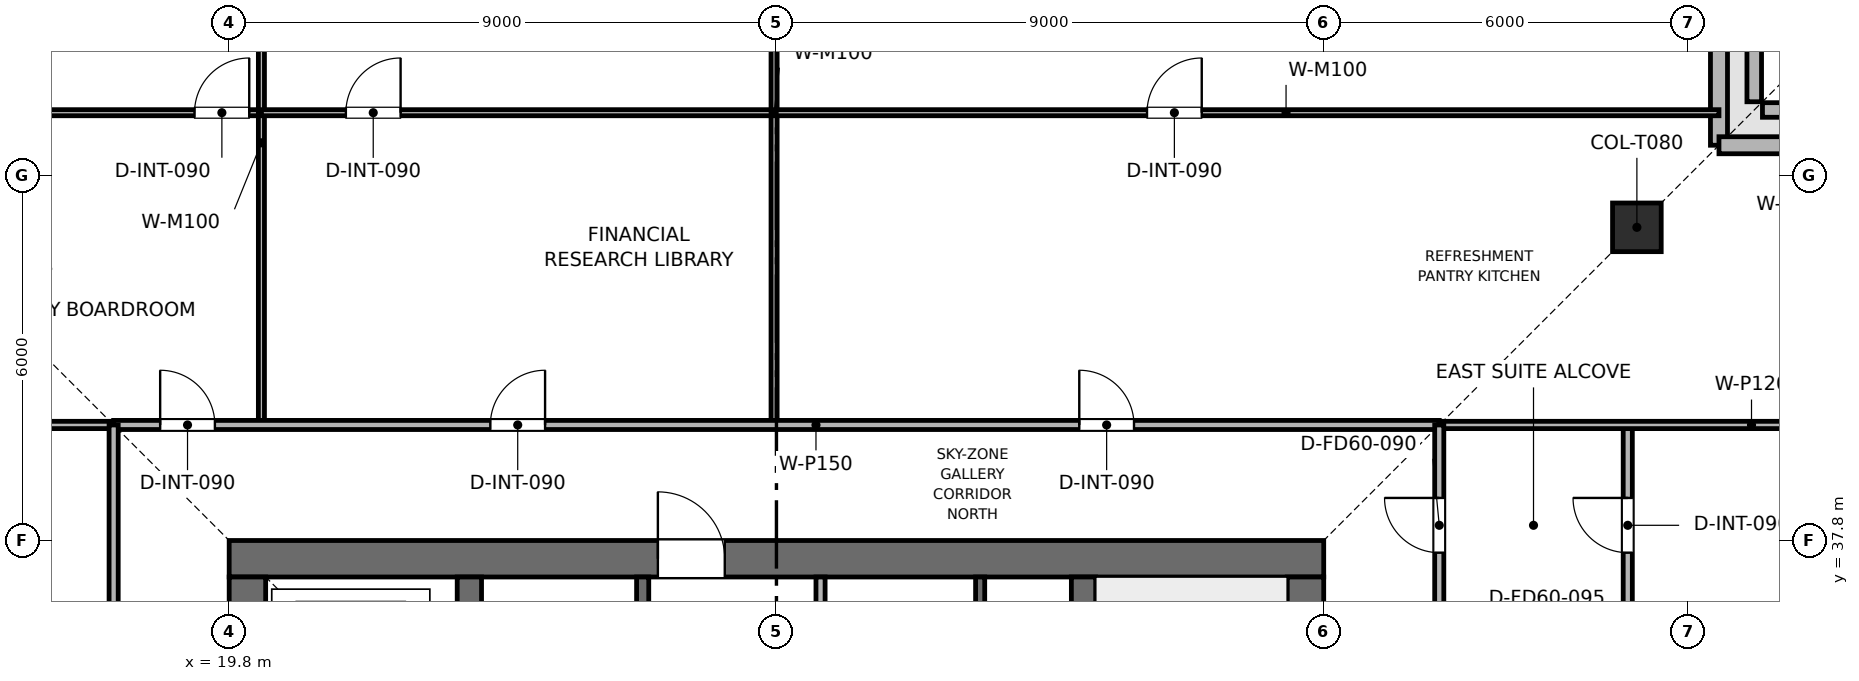
"""IFC4 building model, lengths in metres.
Left out: names, types, materials, properties, quantities, classifications, styles, units other than length and angle.
Written with IfcOpenShell. Run it as: python <this file> out.ifc"""

import sys

from ifc_helpers import new_model, si_unit, direction, frame, frame_2d, origin, origin_2d, place, context, subcontext, project, spatial, rectangle, extrude, element, fill, save


model = new_model("IFC4")
c1 = context("Model", 3, precision=1e-05, world=origin(), true_north=direction((0.0, 1.0)))
c2 = subcontext(c1, "Body", "Model", "MODEL_VIEW")
j1 = project(units=[si_unit("LENGTHUNIT", "METRE"), si_unit("PLANEANGLEUNIT", "RADIAN")], contexts=[c1])
p1 = place(None, origin())
s1 = spatial("IfcSite", under=j1, at=p1, CompositionType="ELEMENT")
p2 = place(p1, origin())
s2 = spatial("IfcBuilding", under=s1, at=p2, CompositionType="ELEMENT")
p3 = place(p2, frame((0.0, 0.0, 344.25)))
s3 = spatial("IfcBuildingStorey", under=s2, at=p3, CompositionType="ELEMENT", Elevation=344.25)
p4 = place(p3, frame((19.8, 37.5, 0.0), z_axis=(0.0, 0.0, 1.0), x_axis=(1.0, 0.0, 0.0)))
e1 = element("IfcWall", 1, at=p4, inside=s3, PredefinedType="SHEAR", context=c2, shape_type="SweptSolid", body=[
    extrude(rectangle(XDim=18.0, YDim=0.6, at=frame_2d((9.0, 0.0))), origin(), (0.0, 0.0, 1.0), 3.75),
])
p5 = place(p4, frame((7.05, 0.0, 0.0)))
e2 = element("IfcOpeningElement", 2, at=p5, cuts=e1, PredefinedType="OPENING", context=c2, shape_type="SweptSolid", body=[
    extrude(rectangle(XDim=1.1, YDim=2.15, at=frame_2d((0.55, 1.075))), frame((0.0, 0.31, 0.0), z_axis=(0.0, -1.0, 0.0), x_axis=(1.0, 0.0, 0.0)), (0.0, 0.0, 1.0), 0.62),
])
p6 = place(p3, frame((20.1, 20.4, 0.0), z_axis=(0.0, 0.0, 1.0), x_axis=(0.0, 1.0, 0.0)))
e3 = element("IfcWall", 3, at=p6, inside=s3, PredefinedType="SHEAR", context=c2, shape_type="SweptSolid", body=[
    extrude(rectangle(XDim=16.8, YDim=0.6, at=frame_2d((8.4, 0.0))), origin(), (0.0, 0.0, 1.0), 3.75),
])
p7 = place(p6, frame((10.4, 0.0, 0.0)))
e4 = element("IfcOpeningElement", 4, at=p7, cuts=e3, PredefinedType="OPENING", context=c2, shape_type="SweptSolid", body=[
    extrude(rectangle(XDim=1.1, YDim=2.15, at=frame_2d((0.55, 1.075))), frame((0.0, 0.31, 0.0), z_axis=(0.0, -1.0, 0.0), x_axis=(1.0, 0.0, 0.0)), (0.0, 0.0, 1.0), 0.62),
])
p8 = place(p3, frame((37.5, 20.4, 0.0), z_axis=(0.0, 0.0, 1.0), x_axis=(0.0, 1.0, 0.0)))
e5 = element("IfcWall", 5, at=p8, inside=s3, PredefinedType="SHEAR", context=c2, shape_type="SweptSolid", body=[
    extrude(rectangle(XDim=16.8, YDim=0.6, at=frame_2d((8.4, 0.0))), origin(), (0.0, 0.0, 1.0), 3.75),
])
p9 = place(p8, frame((4.9, 0.0, 0.0)))
e6 = element("IfcOpeningElement", 6, at=p9, cuts=e5, PredefinedType="OPENING", context=c2, shape_type="SweptSolid", body=[
    extrude(rectangle(XDim=1.1, YDim=2.15, at=frame_2d((0.55, 1.075))), frame((0.0, 0.31, 0.0), z_axis=(0.0, -1.0, 0.0), x_axis=(1.0, 0.0, 0.0)), (0.0, 0.0, 1.0), 0.62),
])
for number, where, z_axis, x_axis in (
    (7, (23.75, 20.4, 0.0), (0.0, 0.0, 1.0), (0.0, 1.0, 0.0)),
    (8, (33.85, 20.4, 0.0), (0.0, 0.0, 1.0), (0.0, 1.0, 0.0)),
):
    element("IfcWall", number, at=place(p3, frame(where, z_axis=z_axis, x_axis=x_axis)), inside=s3, PredefinedType="SHEAR", context=c2, shape_type="SweptSolid", body=[
        extrude(rectangle(XDim=16.8, YDim=0.4, at=frame_2d((8.4, 0.0))), origin(), (0.0, 0.0, 1.0), 3.75),
    ])
p10 = place(p3, frame((42.95, 42.95, 0.003), z_axis=(0.0, 0.0, 1.0), x_axis=(1.0, 0.0, 0.0)))
e9 = element("IfcColumn", 9, at=p10, inside=s3, PredefinedType="COLUMN", context=c2, shape_type="SweptSolid", body=[
    extrude(rectangle(XDim=0.8, YDim=0.8, at=origin_2d()), origin(), (0.0, 0.0, 1.0), 3.504),
])
for number, where, z_axis, x_axis in (
    (10, (50.745, 44.88, 0.0), (0.0, 0.0, 1.0), (-1.0, 0.0, 0.0)),
    (11, (44.88, 45.015, 0.0), (0.0, 0.0, 1.0), (0.0, 1.0, 0.0)),
):
    element("IfcWall", number, at=place(p3, frame(where, z_axis=z_axis, x_axis=x_axis)), inside=s3, PredefinedType="PARAPET", context=c2, shape_type="SweptSolid", body=[
        extrude(rectangle(XDim=5.73, YDim=0.24, at=frame_2d((2.865, 0.0))), origin(), (0.0, 0.0, 1.0), 1.2),
    ])
p11 = place(p3, frame((44.3, 49.97, 0.0), z_axis=(0.0, 0.0, 1.0), x_axis=(0.0, -1.0, 0.0)))
e12 = element("IfcWall", 12, at=p11, inside=s3, PredefinedType="SOLIDWALL", context=c2, shape_type="SweptSolid", body=[
    extrude(rectangle(XDim=5.67, YDim=0.28, at=frame_2d((2.835, 0.0))), origin(), (0.0, 0.0, 1.0), 3.51),
])
p12 = place(p11, frame((1.585, 0.0, 0.9)))
e13 = element("IfcOpeningElement", 13, at=p12, cuts=e12, PredefinedType="OPENING", context=c2, shape_type="SweptSolid", body=[
    extrude(rectangle(XDim=2.5, YDim=1.9, at=frame_2d((1.25, 0.95))), frame((0.0, 0.15, 0.0), z_axis=(0.0, -1.0, 0.0), x_axis=(1.0, 0.0, 0.0)), (0.0, 0.0, 1.0), 0.3),
])
p13 = place(p3, frame((44.3, 44.3, 0.0), z_axis=(0.0, 0.0, 1.0), x_axis=(1.0, 0.0, 0.0)))
e14 = element("IfcWall", 14, at=p13, inside=s3, PredefinedType="SOLIDWALL", context=c2, shape_type="SweptSolid", body=[
    extrude(rectangle(XDim=5.67, YDim=0.28, at=frame_2d((2.835, 0.0))), origin(), (0.0, 0.0, 1.0), 3.51),
])
p14 = place(p13, frame((1.585, 0.0, 0.9)))
e15 = element("IfcOpeningElement", 15, at=p14, cuts=e14, PredefinedType="OPENING", context=c2, shape_type="SweptSolid", body=[
    extrude(rectangle(XDim=2.5, YDim=1.9, at=frame_2d((1.25, 0.95))), frame((0.0, 0.15, 0.0), z_axis=(0.0, -1.0, 0.0), x_axis=(1.0, 0.0, 0.0)), (0.0, 0.0, 1.0), 0.3),
])
p15 = place(p3, frame((32.15, 34.0, 0.0), z_axis=(0.0, 0.0, 1.0), x_axis=(0.0, 1.0, 0.0)))
e16 = element("IfcWall", 16, at=p15, inside=s3, PredefinedType="SHEAR", context=c2, shape_type="SweptSolid", body=[
    extrude(rectangle(XDim=3.2, YDim=0.15, at=frame_2d((1.6, 0.0))), origin(), (0.0, 0.0, 1.0), 3.51),
])
p16 = place(p3, frame((26.6, 34.0, 0.0), z_axis=(0.0, 0.0, 1.0), x_axis=(0.0, 1.0, 0.0)))
e17 = element("IfcWall", 17, at=p16, inside=s3, PredefinedType="SHEAR", context=c2, shape_type="SweptSolid", body=[
    extrude(rectangle(XDim=3.2, YDim=0.2, at=frame_2d((1.6, 0.0))), origin(), (0.0, 0.0, 1.0), 3.51),
])
p17 = place(p16, frame((0.75, 0.0, 0.0)))
e18 = element("IfcOpeningElement", 18, at=p17, cuts=e17, PredefinedType="OPENING", context=c2, shape_type="SweptSolid", body=[
    extrude(rectangle(XDim=1.1, YDim=2.15, at=frame_2d((0.55, 1.075))), frame((0.0, 0.11, 0.0), z_axis=(0.0, -1.0, 0.0), x_axis=(1.0, 0.0, 0.0)), (0.0, 0.0, 1.0), 0.22),
])
p18 = place(p3, frame((29.525, 33.925, 0.0), z_axis=(0.0, 0.0, 1.0), x_axis=(0.0, 1.0, 0.0)))
e19 = element("IfcWall", 19, at=p18, inside=s3, PredefinedType="PARTITIONING", context=c2, shape_type="SweptSolid", body=[
    extrude(rectangle(XDim=3.275, YDim=0.15, at=frame_2d((1.637, 0.0))), origin(), (0.0, 0.0, 1.0), 3.51),
])
p19 = place(p18, frame((0.85, 0.0, 0.0)))
e20 = element("IfcOpeningElement", 20, at=p19, cuts=e19, PredefinedType="OPENING", context=c2, shape_type="SweptSolid", body=[
    extrude(rectangle(XDim=0.9, YDim=2.1, at=frame_2d((0.45, 1.05))), frame((0.0, 0.085, 0.0), z_axis=(0.0, -1.0, 0.0), x_axis=(1.0, 0.0, 0.0)), (0.0, 0.0, 1.0), 0.17),
])
p20 = place(p3, frame((13.3, 44.835, 0.0), z_axis=(0.0, 0.0, 1.0), x_axis=(1.0, 0.0, 0.0)))
e21 = element("IfcWall", 21, at=p20, inside=s3, PredefinedType="MOVABLE", context=c2, shape_type="SweptSolid", body=[
    extrude(rectangle(XDim=7.03, YDim=0.1, at=frame_2d((3.515, 0.0))), origin(), (0.0, 0.0, 1.0), 3.095),
])
p21 = place(p20, frame((5.93, 0.0, 0.0)))
e22 = element("IfcOpeningElement", 22, at=p21, cuts=e21, PredefinedType="OPENING", context=c2, shape_type="SweptSolid", body=[
    extrude(rectangle(XDim=0.9, YDim=2.1, at=frame_2d((0.45, 1.05))), frame((0.0, 0.06, 0.0), z_axis=(0.0, -1.0, 0.0), x_axis=(1.0, 0.0, 0.0)), (0.0, 0.0, 1.0), 0.12),
])
p22 = place(p3, frame((20.33, 39.7, 0.0), z_axis=(0.0, 0.0, 1.0), x_axis=(0.0, 1.0, 0.0)))
e23 = element("IfcWall", 23, at=p22, inside=s3, PredefinedType="MOVABLE", context=c2, shape_type="SweptSolid", body=[
    extrude(rectangle(XDim=10.27, YDim=0.1, at=frame_2d((5.135, 0.0))), origin(), (0.0, 0.0, 1.0), 3.095),
])
p23 = place(p3, frame((20.33, 44.835, 0.0), z_axis=(0.0, 0.0, 1.0), x_axis=(1.0, 0.0, 0.0)))
e24 = element("IfcWall", 24, at=p23, inside=s3, PredefinedType="MOVABLE", context=c2, shape_type="SweptSolid", body=[
    extrude(rectangle(XDim=8.431, YDim=0.1, at=frame_2d((4.215, 0.0))), origin(), (0.0, 0.0, 1.0), 3.095),
])
p24 = place(p23, frame((1.389, 0.0, 0.0)))
e25 = element("IfcOpeningElement", 25, at=p24, cuts=e24, PredefinedType="OPENING", context=c2, shape_type="SweptSolid", body=[
    extrude(rectangle(XDim=0.9, YDim=2.1, at=frame_2d((0.45, 1.05))), frame((0.0, 0.06, 0.0), z_axis=(0.0, -1.0, 0.0), x_axis=(1.0, 0.0, 0.0)), (0.0, 0.0, 1.0), 0.12),
])
p25 = place(p3, frame((28.761, 39.7, 0.0), z_axis=(0.0, 0.0, 1.0), x_axis=(0.0, 1.0, 0.0)))
e26 = element("IfcWall", 26, at=p25, inside=s3, PredefinedType="MOVABLE", context=c2, shape_type="SweptSolid", body=[
    extrude(rectangle(XDim=10.27, YDim=0.1, at=frame_2d((5.135, 0.0))), origin(), (0.0, 0.0, 1.0), 2.995),
])
p26 = place(p3, frame((28.761, 44.835, 0.0), z_axis=(0.0, 0.0, 1.0), x_axis=(1.0, 0.0, 0.0)))
e27 = element("IfcWall", 27, at=p26, inside=s3, PredefinedType="MOVABLE", context=c2, shape_type="SweptSolid", body=[
    extrude(rectangle(XDim=15.539, YDim=0.1, at=frame_2d((7.77, 0.0))), origin(), (0.0, 0.0, 1.0), 3.095),
])
p27 = place(p26, frame((6.133, 0.0, 0.0)))
e28 = element("IfcOpeningElement", 28, at=p27, cuts=e27, PredefinedType="OPENING", context=c2, shape_type="SweptSolid", body=[
    extrude(rectangle(XDim=0.9, YDim=2.1, at=frame_2d((0.45, 1.05))), frame((0.0, 0.06, 0.0), z_axis=(0.0, -1.0, 0.0), x_axis=(1.0, 0.0, 0.0)), (0.0, 0.0, 1.0), 0.12),
])
p28 = place(p3, frame((42.8, 28.0, 0.0), z_axis=(0.0, 0.0, 1.0), x_axis=(0.0, 1.0, 0.0)))
e29 = element("IfcWall", 29, at=p28, inside=s3, PredefinedType="PARTITIONING", context=c2, shape_type="SweptSolid", body=[
    extrude(rectangle(XDim=11.7, YDim=0.15, at=frame_2d((5.85, 0.0))), origin(), (0.0, 0.0, 1.0), 3.095),
])
p29 = place(p28, frame((9.6, 0.0, 0.0)))
e30 = element("IfcOpeningElement", 30, at=p29, cuts=e29, PredefinedType="OPENING", context=c2, shape_type="SweptSolid", body=[
    extrude(rectangle(XDim=0.9, YDim=2.1, at=frame_2d((0.45, 1.05))), frame((0.0, 0.085, 0.0), z_axis=(0.0, -1.0, 0.0), x_axis=(1.0, 0.0, 0.0)), (0.0, 0.0, 1.0), 0.17),
])
for number, where, z_axis, x_axis in (
    (31, (7.63, 39.7, 0.0), (0.0, 0.0, 1.0), (1.0, 0.0, 0.0)),
    (32, (39.7, 39.7, 0.0), (0.0, 0.0, 1.0), (1.0, 0.0, 0.0)),
):
    element("IfcWall", number, at=place(p3, frame(where, z_axis=z_axis, x_axis=x_axis)), inside=s3, PredefinedType="PARTITIONING", context=c2, shape_type="SweptSolid", body=[
        extrude(rectangle(XDim=10.27, YDim=0.12, at=frame_2d((5.135, 0.0))), origin(), (0.0, 0.0, 1.0), 3.095),
    ])
p30 = place(p3, frame((17.9, 39.7, 0.0), z_axis=(0.0, 0.0, 1.0), x_axis=(1.0, 0.0, 0.0)))
e33 = element("IfcWall", 33, at=p30, inside=s3, PredefinedType="PARTITIONING", context=c2, shape_type="SweptSolid", body=[
    extrude(rectangle(XDim=21.8, YDim=0.15, at=frame_2d((10.9, 0.0))), origin(), (0.0, 0.0, 1.0), 3.095),
])
p31 = place(p30, frame((0.765, 0.0, 0.0)))
e34 = element("IfcOpeningElement", 34, at=p31, cuts=e33, PredefinedType="OPENING", context=c2, shape_type="SweptSolid", body=[
    extrude(rectangle(XDim=0.9, YDim=2.1, at=frame_2d((0.45, 1.05))), frame((0.0, 0.085, 0.0), z_axis=(0.0, -1.0, 0.0), x_axis=(1.0, 0.0, 0.0)), (0.0, 0.0, 1.0), 0.17),
])
p32 = place(p30, frame((6.195, 0.0, 0.0)))
e35 = element("IfcOpeningElement", 35, at=p32, cuts=e33, PredefinedType="OPENING", context=c2, shape_type="SweptSolid", body=[
    extrude(rectangle(XDim=0.9, YDim=2.1, at=frame_2d((0.45, 1.05))), frame((0.0, 0.085, 0.0), z_axis=(0.0, -1.0, 0.0), x_axis=(1.0, 0.0, 0.0)), (0.0, 0.0, 1.0), 0.17),
])
p33 = place(p30, frame((15.88, 0.0, 0.0)))
e36 = element("IfcOpeningElement", 36, at=p33, cuts=e33, PredefinedType="OPENING", context=c2, shape_type="SweptSolid", body=[
    extrude(rectangle(XDim=0.9, YDim=2.1, at=frame_2d((0.45, 1.05))), frame((0.0, 0.085, 0.0), z_axis=(0.0, -1.0, 0.0), x_axis=(1.0, 0.0, 0.0)), (0.0, 0.0, 1.0), 0.17),
])
p34 = place(p3, frame((17.9, 13.3, 0.0), z_axis=(0.0, 0.0, 1.0), x_axis=(0.0, 1.0, 0.0)))
e37 = element("IfcWall", 37, at=p34, inside=s3, PredefinedType="PARTITIONING", context=c2, shape_type="SweptSolid", body=[
    extrude(rectangle(XDim=26.4, YDim=0.15, at=frame_2d((13.2, 0.0))), origin(), (0.0, 0.0, 1.0), 3.095),
])
p35 = place(p34, frame((12.75, 0.0, 0.0)))
e38 = element("IfcOpeningElement", 38, at=p35, cuts=e37, PredefinedType="OPENING", context=c2, shape_type="SweptSolid", body=[
    extrude(rectangle(XDim=0.9, YDim=2.1, at=frame_2d((0.45, 1.05))), frame((0.0, 0.085, 0.0), z_axis=(0.0, -1.0, 0.0), x_axis=(1.0, 0.0, 0.0)), (0.0, 0.0, 1.0), 0.17),
])
p36 = place(p3, frame((39.7, 24.4, 0.0), z_axis=(0.0, 0.0, 1.0), x_axis=(0.0, 1.0, 0.0)))
e39 = element("IfcWall", 39, at=p36, inside=s3, PredefinedType="PARTITIONING", context=c2, shape_type="SweptSolid", body=[
    extrude(rectangle(XDim=15.3, YDim=0.15, at=frame_2d((7.65, 0.0))), origin(), (0.0, 0.0, 1.0), 3.095),
])
p37 = place(p36, frame((1.35, 0.0, 0.0)))
e40 = element("IfcOpeningElement", 40, at=p37, cuts=e39, PredefinedType="OPENING", context=c2, shape_type="SweptSolid", body=[
    extrude(rectangle(XDim=0.9, YDim=2.1, at=frame_2d((0.45, 1.05))), frame((0.0, 0.085, 0.0), z_axis=(0.0, -1.0, 0.0), x_axis=(1.0, 0.0, 0.0)), (0.0, 0.0, 1.0), 0.17),
])
p38 = place(p36, frame((4.55, 0.0, 0.0)))
e41 = element("IfcOpeningElement", 41, at=p38, cuts=e39, PredefinedType="OPENING", context=c2, shape_type="SweptSolid", body=[
    extrude(rectangle(XDim=0.9, YDim=2.1, at=frame_2d((0.45, 1.05))), frame((0.0, 0.085, 0.0), z_axis=(0.0, -1.0, 0.0), x_axis=(1.0, 0.0, 0.0)), (0.0, 0.0, 1.0), 0.17),
])
p39 = place(p36, frame((7.45, 0.0, 0.0)))
e42 = element("IfcOpeningElement", 42, at=p39, cuts=e39, PredefinedType="OPENING", context=c2, shape_type="SweptSolid", body=[
    extrude(rectangle(XDim=0.9, YDim=2.1, at=frame_2d((0.45, 1.05))), frame((0.0, 0.085, 0.0), z_axis=(0.0, -1.0, 0.0), x_axis=(1.0, 0.0, 0.0)), (0.0, 0.0, 1.0), 0.17),
])
p40 = place(p36, frame((10.2, 0.0, 0.0)))
e43 = element("IfcOpeningElement", 43, at=p40, cuts=e39, PredefinedType="OPENING", context=c2, shape_type="SweptSolid", body=[
    extrude(rectangle(XDim=0.95, YDim=2.1, at=frame_2d((0.475, 1.05))), frame((0.0, 0.085, 0.0), z_axis=(0.0, -1.0, 0.0), x_axis=(1.0, 0.0, 0.0)), (0.0, 0.0, 1.0), 0.17),
])
p41 = place(p36, frame((13.2, 0.0, 0.0)))
e44 = element("IfcOpeningElement", 44, at=p41, cuts=e39, PredefinedType="OPENING", context=c2, shape_type="SweptSolid", body=[
    extrude(rectangle(XDim=0.9, YDim=2.1, at=frame_2d((0.45, 1.05))), frame((0.0, 0.085, 0.0), z_axis=(0.0, -1.0, 0.0), x_axis=(1.0, 0.0, 0.0)), (0.0, 0.0, 1.0), 0.17),
])
p42 = place(p21, origin())
e45 = element("IfcDoor", 45, at=p42, inside=s3, OperationType="SINGLE_SWING_RIGHT", PredefinedType="DOOR", context=c2, shape_type="SweptSolid", body=[
    extrude(rectangle(XDim=0.9, YDim=2.1, at=frame_2d((0.45, 1.05))), frame((0.0, 0.025, 0.0), z_axis=(0.0, -1.0, 0.0), x_axis=(1.0, 0.0, 0.0)), (0.0, 0.0, 1.0), 0.05),
])
fill(e22, e45)
p43 = place(p24, origin())
e46 = element("IfcDoor", 46, at=p43, inside=s3, OperationType="SINGLE_SWING_RIGHT", PredefinedType="DOOR", context=c2, shape_type="SweptSolid", body=[
    extrude(rectangle(XDim=0.9, YDim=2.1, at=frame_2d((0.45, 1.05))), frame((0.0, 0.025, 0.0), z_axis=(0.0, -1.0, 0.0), x_axis=(1.0, 0.0, 0.0)), (0.0, 0.0, 1.0), 0.05),
])
fill(e25, e46)
p44 = place(p27, origin())
e47 = element("IfcDoor", 47, at=p44, inside=s3, OperationType="SINGLE_SWING_RIGHT", PredefinedType="DOOR", context=c2, shape_type="SweptSolid", body=[
    extrude(rectangle(XDim=0.9, YDim=2.1, at=frame_2d((0.45, 1.05))), frame((0.0, 0.025, 0.0), z_axis=(0.0, -1.0, 0.0), x_axis=(1.0, 0.0, 0.0)), (0.0, 0.0, 1.0), 0.05),
])
fill(e28, e47)
p45 = place(p29, origin())
e48 = element("IfcDoor", 48, at=p45, inside=s3, OperationType="SINGLE_SWING_RIGHT", PredefinedType="DOOR", context=c2, shape_type="SweptSolid", body=[
    extrude(rectangle(XDim=0.9, YDim=2.1, at=frame_2d((0.45, 1.05))), frame((0.0, 0.025, 0.0), z_axis=(0.0, -1.0, 0.0), x_axis=(1.0, 0.0, 0.0)), (0.0, 0.0, 1.0), 0.05),
])
fill(e30, e48)
p46 = place(p31, origin())
e49 = element("IfcDoor", 49, at=p46, inside=s3, OperationType="SINGLE_SWING_LEFT", PredefinedType="DOOR", context=c2, shape_type="SweptSolid", body=[
    extrude(rectangle(XDim=0.9, YDim=2.1, at=frame_2d((0.45, 1.05))), frame((0.0, 0.025, 0.0), z_axis=(0.0, -1.0, 0.0), x_axis=(1.0, 0.0, 0.0)), (0.0, 0.0, 1.0), 0.05),
])
fill(e34, e49)
p47 = place(p32, origin())
e50 = element("IfcDoor", 50, at=p47, inside=s3, OperationType="SINGLE_SWING_RIGHT", PredefinedType="DOOR", context=c2, shape_type="SweptSolid", body=[
    extrude(rectangle(XDim=0.9, YDim=2.1, at=frame_2d((0.45, 1.05))), frame((0.0, 0.025, 0.0), z_axis=(0.0, -1.0, 0.0), x_axis=(1.0, 0.0, 0.0)), (0.0, 0.0, 1.0), 0.05),
])
fill(e35, e50)
p48 = place(p33, origin())
e51 = element("IfcDoor", 51, at=p48, inside=s3, OperationType="SINGLE_SWING_LEFT", PredefinedType="DOOR", context=c2, shape_type="SweptSolid", body=[
    extrude(rectangle(XDim=0.9, YDim=2.1, at=frame_2d((0.45, 1.05))), frame((0.0, 0.025, 0.0), z_axis=(0.0, -1.0, 0.0), x_axis=(1.0, 0.0, 0.0)), (0.0, 0.0, 1.0), 0.05),
])
fill(e36, e51)
p49 = place(p41, origin())
e52 = element("IfcDoor", 52, at=p49, inside=s3, OperationType="SINGLE_SWING_RIGHT", PredefinedType="DOOR", context=c2, shape_type="SweptSolid", body=[
    extrude(rectangle(XDim=0.9, YDim=2.1, at=frame_2d((0.45, 1.05))), frame((0.0, 0.025, 0.0), z_axis=(0.0, -1.0, 0.0), x_axis=(1.0, 0.0, 0.0)), (0.0, 0.0, 1.0), 0.05),
])
fill(e44, e52)
p50 = place(p5, origin())
e53 = element("IfcDoor", 53, at=p50, inside=s3, OperationType="SINGLE_SWING_LEFT", PredefinedType="DOOR", context=c2, shape_type="SweptSolid", body=[
    extrude(rectangle(XDim=1.1, YDim=2.15, at=frame_2d((0.55, 1.075))), frame((0.0, 0.025, 0.0), z_axis=(0.0, -1.0, 0.0), x_axis=(1.0, 0.0, 0.0)), (0.0, 0.0, 1.0), 0.05),
])
fill(e2, e53)
save(model, sys.argv[1])
